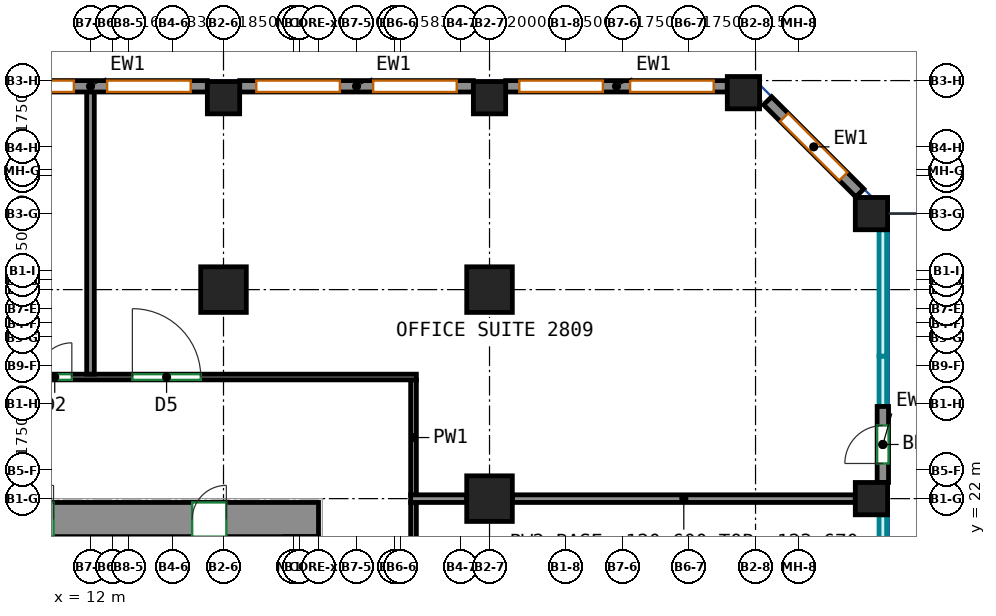
"""IFC4 building model, lengths in metres.
Left out: names, types, materials, properties, quantities, classifications, styles, units other than length and angle.
Written with IfcOpenShell. Run it as: python <this file> out.ifc"""

import sys

from ifc_helpers import new_model, si_unit, direction, frame, frame_2d, origin, origin_2d, place, context, subcontext, project, spatial, rectangle, extrude, source, transform, mapped, element, fill, save


model = new_model("IFC4")
c1 = context("Model", 3, precision=1e-05, world=origin(), true_north=direction((0.0, 1.0)))
c2 = subcontext(c1, "Body", "Model", "MODEL_VIEW")
j1 = project(units=[si_unit("LENGTHUNIT", "METRE"), si_unit("PLANEANGLEUNIT", "RADIAN")], contexts=[c1])
p1 = place(None, origin())
s1 = spatial("IfcSite", under=j1, at=p1, CompositionType="ELEMENT")
p2 = place(p1, origin())
s2 = spatial("IfcBuilding", under=s1, at=p2, CompositionType="ELEMENT")
p3 = place(p2, frame((0.0, 0.0, 120.6)))
s3 = spatial("IfcBuildingStorey", under=s2, at=p3, CompositionType="ELEMENT", Elevation=120.6)
m1 = source(origin(), c2, "Body", "SweptSolid", [
    extrude(rectangle(XDim=1.2, YDim=1.2, at=origin_2d()), origin(), (0.0, 0.0, 1.0), 3.72),
])
p4 = place(p3, frame((15.5, 27.5, 0.0), z_axis=(0.0, 0.0, 1.0), x_axis=(1.0, 0.0, 0.0)))
e1 = element("IfcColumn", 1, at=p4, inside=s3, PredefinedType="COLUMN", context=c2, shape_type="MappedRepresentation", body=[
    mapped(m1, transform((0.0, 0.0, 0.0))),
])
m2 = source(origin(), c2, "Body", "SweptSolid", [
    extrude(rectangle(XDim=0.85, YDim=0.85, at=origin_2d()), origin(), (0.0, 0.0, 1.0), 3.72),
])
p5 = place(p3, frame((15.5, 32.55, 0.0), z_axis=(0.0, 0.0, 1.0), x_axis=(1.0, 0.0, 0.0)))
e2 = element("IfcColumn", 2, at=p5, inside=s3, PredefinedType="COLUMN", context=c2, shape_type="MappedRepresentation", body=[
    mapped(m2, transform((0.0, 0.0, 0.0))),
])
for number, where, z_axis, x_axis in (
    (3, (22.5, 22.0, 0.0), (0.0, 0.0, 1.0), (1.0, 0.0, 0.0)),
    (4, (22.5, 27.5, 0.0), (0.0, 0.0, 1.0), (1.0, 0.0, 0.0)),
):
    element("IfcColumn", number, at=place(p3, frame(where, z_axis=z_axis, x_axis=x_axis)), inside=s3, PredefinedType="COLUMN", context=c2, shape_type="MappedRepresentation", body=[
        mapped(m1, transform((0.0, 0.0, 0.0))),
    ])
for number, where, z_axis, x_axis in (
    (5, (22.5, 32.55, 0.0), (0.0, 0.0, 1.0), (1.0, 0.0, 0.0)),
    (6, (29.182, 32.682, 0.0), (0.0, 0.0, 1.0), (1.0, 0.0, 0.0)),
    (7, (32.55, 22.0, 0.0), (0.0, 0.0, 1.0), (1.0, 0.0, 0.0)),
    (8, (32.55, 29.5, 0.0), (0.0, 0.0, 1.0), (1.0, 0.0, 0.0)),
):
    element("IfcColumn", number, at=place(p3, frame(where, z_axis=z_axis, x_axis=x_axis)), inside=s3, PredefinedType="COLUMN", context=c2, shape_type="MappedRepresentation", body=[
        mapped(m2, transform((0.0, 0.0, 0.0))),
    ])
m3 = source(origin(), c2, "Body", "SweptSolid", [
    extrude(rectangle(XDim=33.9, YDim=0.9, at=frame_2d((16.95, 0.0))), origin(), (0.0, 0.0, 1.0), 3.72),
])
p6 = place(p3, frame((-15.9, 21.45, 0.0), z_axis=(0.0, 0.0, 1.0), x_axis=(1.0, 0.0, 0.0)))
e9 = element("IfcWall", 9, at=p6, inside=s3, PredefinedType="SHEAR", context=c2, shape_type="MappedRepresentation", body=[
    mapped(m3, transform((0.0, 0.0, 0.0))),
])
p7 = place(p6, frame((7.12, 0.0, 0.0)))
e10 = element("IfcOpeningElement", 10, at=p7, cuts=e9, PredefinedType="OPENING", context=c2, shape_type="SweptSolid", body=[
    extrude(rectangle(XDim=0.9, YDim=2.1, at=frame_2d((0.45, 1.05))), frame((0.0, 0.46, 0.0), z_axis=(0.0, -1.0, 0.0), x_axis=(1.0, 0.0, 0.0)), (0.0, 0.0, 1.0), 0.92),
])
p8 = place(p6, frame((12.427, 0.0, 0.0)))
e11 = element("IfcOpeningElement", 11, at=p8, cuts=e9, PredefinedType="OPENING", context=c2, shape_type="SweptSolid", body=[
    extrude(rectangle(XDim=0.9, YDim=2.1, at=frame_2d((0.45, 1.05))), frame((0.0, 0.46, 0.0), z_axis=(0.0, -1.0, 0.0), x_axis=(1.0, 0.0, 0.0)), (0.0, 0.0, 1.0), 0.92),
])
p9 = place(p6, frame((17.465, 0.0, 0.0)))
e12 = element("IfcOpeningElement", 12, at=p9, cuts=e9, PredefinedType="OPENING", context=c2, shape_type="SweptSolid", body=[
    extrude(rectangle(XDim=0.9, YDim=2.1, at=frame_2d((0.45, 1.05))), frame((0.0, 0.46, 0.0), z_axis=(0.0, -1.0, 0.0), x_axis=(1.0, 0.0, 0.0)), (0.0, 0.0, 1.0), 0.92),
])
p10 = place(p6, frame((21.686, 0.0, 0.0)))
e13 = element("IfcOpeningElement", 13, at=p10, cuts=e9, PredefinedType="OPENING", context=c2, shape_type="SweptSolid", body=[
    extrude(rectangle(XDim=0.9, YDim=2.1, at=frame_2d((0.45, 1.05))), frame((0.0, 0.46, 0.0), z_axis=(0.0, -1.0, 0.0), x_axis=(1.0, 0.0, 0.0)), (0.0, 0.0, 1.0), 0.92),
])
p11 = place(p6, frame((26.027, 0.0, 0.0)))
e14 = element("IfcOpeningElement", 14, at=p11, cuts=e9, PredefinedType="OPENING", context=c2, shape_type="SweptSolid", body=[
    extrude(rectangle(XDim=0.9, YDim=2.1, at=frame_2d((0.45, 1.05))), frame((0.0, 0.46, 0.0), z_axis=(0.0, -1.0, 0.0), x_axis=(1.0, 0.0, 0.0)), (0.0, 0.0, 1.0), 0.92),
])
p12 = place(p6, frame((2.425, 0.0, 0.0)))
e15 = element("IfcOpeningElement", 15, at=p12, cuts=e9, PredefinedType="OPENING", context=c2, shape_type="SweptSolid", body=[
    extrude(rectangle(XDim=0.9, YDim=2.1, at=frame_2d((0.45, 1.05))), frame((0.0, 0.46, 0.0), z_axis=(0.0, -1.0, 0.0), x_axis=(1.0, 0.0, 0.0)), (0.0, 0.0, 1.0), 0.92),
])
p13 = place(p6, frame((30.575, 0.0, 0.0)))
e16 = element("IfcOpeningElement", 16, at=p13, cuts=e9, PredefinedType="OPENING", context=c2, shape_type="SweptSolid", body=[
    extrude(rectangle(XDim=0.9, YDim=2.1, at=frame_2d((0.45, 1.05))), frame((0.0, 0.46, 0.0), z_axis=(0.0, -1.0, 0.0), x_axis=(1.0, 0.0, 0.0)), (0.0, 0.0, 1.0), 0.92),
])
m4 = source(origin(), c2, "Body", "SweptSolid", [
    extrude(rectangle(XDim=2.0, YDim=0.3, at=frame_2d((1.0, 0.0))), origin(), (0.0, 0.0, 1.0), 3.72),
])
p14 = place(p3, frame((32.85, 22.425, 0.0), z_axis=(0.0, 0.0, 1.0), x_axis=(0.0, 1.0, 0.0)))
e17 = element("IfcWall", 17, at=p14, inside=s3, PredefinedType="SOLIDWALL", context=c2, shape_type="MappedRepresentation", body=[
    mapped(m4, transform((0.0, 0.0, 0.0))),
])
p15 = place(p14, frame((0.5, 0.0, 0.0)))
e18 = element("IfcOpeningElement", 18, at=p15, cuts=e17, PredefinedType="OPENING", context=c2, shape_type="SweptSolid", body=[
    extrude(rectangle(XDim=1.0, YDim=2.1, at=frame_2d((0.5, 1.05))), frame((0.0, 0.16, 0.0), z_axis=(0.0, -1.0, 0.0), x_axis=(1.0, 0.0, 0.0)), (0.0, 0.0, 1.0), 0.32),
])
m5 = source(origin(), c2, "Body", "SweptSolid", [
    extrude(rectangle(XDim=3.429, YDim=0.3, at=frame_2d((1.715, 0.0))), origin(), (0.0, 0.0, 1.0), 3.72),
])
p16 = place(p3, frame((32.244, 30.044, 0.0), z_axis=(0.0, 0.0, 1.0), x_axis=(-0.707106781187, 0.707106781187, 0.0)))
e19 = element("IfcWall", 19, at=p16, inside=s3, PredefinedType="SOLIDWALL", context=c2, shape_type="MappedRepresentation", body=[
    mapped(m5, transform((0.0, 0.0, 0.0))),
])
p17 = place(p16, frame((0.615, 0.0, 0.7)))
e20 = element("IfcOpeningElement", 20, at=p17, cuts=e19, PredefinedType="OPENING", context=c2, shape_type="SweptSolid", body=[
    extrude(rectangle(XDim=2.2, YDim=2.25, at=frame_2d((1.1, 1.125))), frame((0.0, 0.16, 0.0), z_axis=(0.0, -1.0, 0.0), x_axis=(1.0, 0.0, 0.0)), (0.0, 0.0, 1.0), 0.32),
])
m6 = source(origin(), c2, "Body", "SweptSolid", [
    extrude(rectangle(XDim=5.832, YDim=0.3, at=frame_2d((2.916, 0.0))), origin(), (0.0, 0.0, 1.0), 3.72),
])
p18 = place(p3, frame((28.757, 32.85, 0.0), z_axis=(0.0, 0.0, 1.0), x_axis=(-1.0, 0.0, 0.0)))
e21 = element("IfcWall", 21, at=p18, inside=s3, PredefinedType="SOLIDWALL", context=c2, shape_type="MappedRepresentation", body=[
    mapped(m6, transform((0.0, 0.0, 0.0))),
])
p19 = place(p18, frame((0.358, 0.0, 0.7)))
e22 = element("IfcOpeningElement", 22, at=p19, cuts=e21, PredefinedType="OPENING", context=c2, shape_type="SweptSolid", body=[
    extrude(rectangle(XDim=2.2, YDim=2.25, at=frame_2d((1.1, 1.125))), frame((0.0, 0.16, 0.0), z_axis=(0.0, -1.0, 0.0), x_axis=(1.0, 0.0, 0.0)), (0.0, 0.0, 1.0), 0.32),
])
p20 = place(p18, frame((3.274, 0.0, 0.7)))
e23 = element("IfcOpeningElement", 23, at=p20, cuts=e21, PredefinedType="OPENING", context=c2, shape_type="SweptSolid", body=[
    extrude(rectangle(XDim=2.2, YDim=2.25, at=frame_2d((1.1, 1.125))), frame((0.0, 0.16, 0.0), z_axis=(0.0, -1.0, 0.0), x_axis=(1.0, 0.0, 0.0)), (0.0, 0.0, 1.0), 0.32),
])
m7 = source(origin(), c2, "Body", "SweptSolid", [
    extrude(rectangle(XDim=6.15, YDim=0.3, at=frame_2d((3.075, 0.0))), origin(), (0.0, 0.0, 1.0), 3.72),
])
p21 = place(p3, frame((22.075, 32.85, 0.0), z_axis=(0.0, 0.0, 1.0), x_axis=(-1.0, 0.0, 0.0)))
e24 = element("IfcWall", 24, at=p21, inside=s3, PredefinedType="SOLIDWALL", context=c2, shape_type="MappedRepresentation", body=[
    mapped(m7, transform((0.0, 0.0, 0.0))),
])
p22 = place(p21, frame((0.438, 0.0, 0.7)))
e25 = element("IfcOpeningElement", 25, at=p22, cuts=e24, PredefinedType="OPENING", context=c2, shape_type="SweptSolid", body=[
    extrude(rectangle(XDim=2.2, YDim=2.25, at=frame_2d((1.1, 1.125))), frame((0.0, 0.16, 0.0), z_axis=(0.0, -1.0, 0.0), x_axis=(1.0, 0.0, 0.0)), (0.0, 0.0, 1.0), 0.32),
])
p23 = place(p21, frame((3.512, 0.0, 0.7)))
e26 = element("IfcOpeningElement", 26, at=p23, cuts=e24, PredefinedType="OPENING", context=c2, shape_type="SweptSolid", body=[
    extrude(rectangle(XDim=2.2, YDim=2.25, at=frame_2d((1.1, 1.125))), frame((0.0, 0.16, 0.0), z_axis=(0.0, -1.0, 0.0), x_axis=(1.0, 0.0, 0.0)), (0.0, 0.0, 1.0), 0.32),
])
p24 = place(p3, frame((15.075, 32.85, 0.0), z_axis=(0.0, 0.0, 1.0), x_axis=(-1.0, 0.0, 0.0)))
e27 = element("IfcWall", 27, at=p24, inside=s3, PredefinedType="SOLIDWALL", context=c2, shape_type="MappedRepresentation", body=[
    mapped(m7, transform((0.0, 0.0, 0.0))),
])
p25 = place(p24, frame((0.438, 0.0, 0.7)))
e28 = element("IfcOpeningElement", 28, at=p25, cuts=e27, PredefinedType="OPENING", context=c2, shape_type="SweptSolid", body=[
    extrude(rectangle(XDim=2.2, YDim=2.25, at=frame_2d((1.1, 1.125))), frame((0.0, 0.16, 0.0), z_axis=(0.0, -1.0, 0.0), x_axis=(1.0, 0.0, 0.0)), (0.0, 0.0, 1.0), 0.32),
])
p26 = place(p24, frame((3.512, 0.0, 0.7)))
e29 = element("IfcOpeningElement", 29, at=p26, cuts=e27, PredefinedType="OPENING", context=c2, shape_type="SweptSolid", body=[
    extrude(rectangle(XDim=2.2, YDim=2.25, at=frame_2d((1.1, 1.125))), frame((0.0, 0.16, 0.0), z_axis=(0.0, -1.0, 0.0), x_axis=(1.0, 0.0, 0.0)), (0.0, 0.0, 1.0), 0.32),
])
p27 = place(p3, frame((20.5, 17.75, 0.0), z_axis=(0.0, 0.0, 1.0), x_axis=(0.0, 1.0, 0.0)))
e30 = element("IfcWall", 30, at=p27, inside=s3, PredefinedType="PARTITIONING", context=c2, shape_type="SweptSolid", body=[
    extrude(rectangle(XDim=4.16, YDim=0.15, at=frame_2d((2.08, 0.0))), origin(), (0.0, 0.0, 1.0), 3.72),
])
p28 = place(p3, frame((20.5, 22.09, 0.0), z_axis=(0.0, 0.0, 1.0), x_axis=(0.0, 1.0, 0.0)))
e31 = element("IfcWall", 31, at=p28, inside=s3, PredefinedType="PARTITIONING", context=c2, shape_type="SweptSolid", body=[
    extrude(rectangle(XDim=3.035, YDim=0.15, at=frame_2d((1.518, 0.0))), origin(), (0.0, 0.0, 1.0), 3.72),
])
p29 = place(p3, frame((-19.6, 25.2, 0.0), z_axis=(0.0, 0.0, 1.0), x_axis=(1.0, 0.0, 0.0)))
e32 = element("IfcWall", 32, at=p29, inside=s3, PredefinedType="PARTITIONING", context=c2, shape_type="SweptSolid", body=[
    extrude(rectangle(XDim=40.175, YDim=0.15, at=frame_2d((20.087, 0.0))), origin(), (0.0, 0.0, 1.0), 3.72),
])
p30 = place(p29, frame((1.104, 0.0, 0.0)))
e33 = element("IfcOpeningElement", 33, at=p30, cuts=e32, PredefinedType="OPENING", context=c2, shape_type="SweptSolid", body=[
    extrude(rectangle(XDim=0.9, YDim=2.1, at=frame_2d((0.45, 1.05))), frame((0.0, 0.085, 0.0), z_axis=(0.0, -1.0, 0.0), x_axis=(1.0, 0.0, 0.0)), (0.0, 0.0, 1.0), 0.17),
])
p31 = place(p29, frame((5.296, 0.0, 0.0)))
e34 = element("IfcOpeningElement", 34, at=p31, cuts=e32, PredefinedType="OPENING", context=c2, shape_type="SweptSolid", body=[
    extrude(rectangle(XDim=0.9, YDim=2.1, at=frame_2d((0.45, 1.05))), frame((0.0, 0.085, 0.0), z_axis=(0.0, -1.0, 0.0), x_axis=(1.0, 0.0, 0.0)), (0.0, 0.0, 1.0), 0.17),
])
p32 = place(p29, frame((18.302, 0.0, 0.0)))
e35 = element("IfcOpeningElement", 35, at=p32, cuts=e32, PredefinedType="OPENING", context=c2, shape_type="SweptSolid", body=[
    extrude(rectangle(XDim=1.0, YDim=2.1, at=frame_2d((0.5, 1.05))), frame((0.0, 0.085, 0.0), z_axis=(0.0, -1.0, 0.0), x_axis=(1.0, 0.0, 0.0)), (0.0, 0.0, 1.0), 0.17),
])
p33 = place(p29, frame((30.209, 0.0, 0.0)))
e36 = element("IfcOpeningElement", 36, at=p33, cuts=e32, PredefinedType="OPENING", context=c2, shape_type="SweptSolid", body=[
    extrude(rectangle(XDim=0.9, YDim=2.1, at=frame_2d((0.45, 1.05))), frame((0.0, 0.085, 0.0), z_axis=(0.0, -1.0, 0.0), x_axis=(1.0, 0.0, 0.0)), (0.0, 0.0, 1.0), 0.17),
])
p34 = place(p29, frame((32.702, 0.0, 0.0)))
e37 = element("IfcOpeningElement", 37, at=p34, cuts=e32, PredefinedType="OPENING", context=c2, shape_type="SweptSolid", body=[
    extrude(rectangle(XDim=1.8, YDim=2.1, at=frame_2d((0.9, 1.05))), frame((0.0, 0.085, 0.0), z_axis=(0.0, -1.0, 0.0), x_axis=(1.0, 0.0, 0.0)), (0.0, 0.0, 1.0), 0.17),
])
p35 = place(p3, frame((20.426, 22.0, 0.0), z_axis=(0.0, 0.0, 1.0), x_axis=(1.0, 0.0, 0.0)))
e38 = element("IfcWall", 38, at=p35, inside=s3, PredefinedType="PARTITIONING", context=c2, shape_type="SweptSolid", body=[
    extrude(rectangle(XDim=1.474, YDim=0.2, at=frame_2d((0.737, 0.0))), origin(), (0.0, 0.0, 1.0), 3.72),
])
p36 = place(p3, frame((23.1, 22.0, 0.0), z_axis=(0.0, 0.0, 1.0), x_axis=(1.0, 0.0, 0.0)))
e39 = element("IfcWall", 39, at=p36, inside=s3, PredefinedType="PARTITIONING", context=c2, shape_type="SweptSolid", body=[
    extrude(rectangle(XDim=9.025, YDim=0.2, at=frame_2d((4.512, 0.0))), origin(), (0.0, 0.0, 1.0), 3.07),
])
p37 = place(p3, frame((12.0, 25.276, 0.0), z_axis=(0.0, 0.0, 1.0), x_axis=(0.0, 1.0, 0.0)))
e40 = element("IfcWall", 40, at=p37, inside=s3, PredefinedType="PARTITIONING", context=c2, shape_type="SweptSolid", body=[
    extrude(rectangle(XDim=7.474, YDim=0.2, at=frame_2d((3.737, 0.0))), origin(), (0.0, 0.0, 1.0), 3.72),
])
p38 = place(p15, origin())
e41 = element("IfcDoor", 41, at=p38, inside=s3, OperationType="SINGLE_SWING_LEFT", PredefinedType="DOOR", context=c2, shape_type="SweptSolid", body=[
    extrude(rectangle(XDim=1.0, YDim=2.1, at=frame_2d((0.5, 1.05))), frame((0.0, 0.025, 0.0), z_axis=(0.0, -1.0, 0.0), x_axis=(1.0, 0.0, 0.0)), (0.0, 0.0, 1.0), 0.05),
])
fill(e18, e41)
p39 = place(p17, origin())
e42 = element("IfcWindow", 42, at=p39, inside=s3, PartitioningType="SINGLE_PANEL", PredefinedType="WINDOW", context=c2, shape_type="SweptSolid", body=[
    extrude(rectangle(XDim=2.2, YDim=2.25, at=frame_2d((1.1, 1.125))), frame((0.0, 0.03, 0.0), z_axis=(0.0, -1.0, 0.0), x_axis=(1.0, 0.0, 0.0)), (0.0, 0.0, 1.0), 0.06),
])
fill(e20, e42)
p40 = place(p19, origin())
e43 = element("IfcWindow", 43, at=p40, inside=s3, PartitioningType="SINGLE_PANEL", PredefinedType="WINDOW", context=c2, shape_type="SweptSolid", body=[
    extrude(rectangle(XDim=2.2, YDim=2.25, at=frame_2d((1.1, 1.125))), frame((0.0, 0.03, 0.0), z_axis=(0.0, -1.0, 0.0), x_axis=(1.0, 0.0, 0.0)), (0.0, 0.0, 1.0), 0.06),
])
fill(e22, e43)
p41 = place(p20, origin())
e44 = element("IfcWindow", 44, at=p41, inside=s3, PartitioningType="SINGLE_PANEL", PredefinedType="WINDOW", context=c2, shape_type="SweptSolid", body=[
    extrude(rectangle(XDim=2.2, YDim=2.25, at=frame_2d((1.1, 1.125))), frame((0.0, 0.03, 0.0), z_axis=(0.0, -1.0, 0.0), x_axis=(1.0, 0.0, 0.0)), (0.0, 0.0, 1.0), 0.06),
])
fill(e23, e44)
p42 = place(p22, origin())
e45 = element("IfcWindow", 45, at=p42, inside=s3, PartitioningType="SINGLE_PANEL", PredefinedType="WINDOW", context=c2, shape_type="SweptSolid", body=[
    extrude(rectangle(XDim=2.2, YDim=2.25, at=frame_2d((1.1, 1.125))), frame((0.0, 0.03, 0.0), z_axis=(0.0, -1.0, 0.0), x_axis=(1.0, 0.0, 0.0)), (0.0, 0.0, 1.0), 0.06),
])
fill(e25, e45)
p43 = place(p23, origin())
e46 = element("IfcWindow", 46, at=p43, inside=s3, PartitioningType="SINGLE_PANEL", PredefinedType="WINDOW", context=c2, shape_type="SweptSolid", body=[
    extrude(rectangle(XDim=2.2, YDim=2.25, at=frame_2d((1.1, 1.125))), frame((0.0, 0.03, 0.0), z_axis=(0.0, -1.0, 0.0), x_axis=(1.0, 0.0, 0.0)), (0.0, 0.0, 1.0), 0.06),
])
fill(e26, e46)
p44 = place(p25, origin())
e47 = element("IfcWindow", 47, at=p44, inside=s3, PartitioningType="SINGLE_PANEL", PredefinedType="WINDOW", context=c2, shape_type="SweptSolid", body=[
    extrude(rectangle(XDim=2.2, YDim=2.25, at=frame_2d((1.1, 1.125))), frame((0.0, 0.03, 0.0), z_axis=(0.0, -1.0, 0.0), x_axis=(1.0, 0.0, 0.0)), (0.0, 0.0, 1.0), 0.06),
])
fill(e28, e47)
p45 = place(p26, origin())
e48 = element("IfcWindow", 48, at=p45, inside=s3, PartitioningType="SINGLE_PANEL", PredefinedType="WINDOW", context=c2, shape_type="SweptSolid", body=[
    extrude(rectangle(XDim=2.2, YDim=2.25, at=frame_2d((1.1, 1.125))), frame((0.0, 0.03, 0.0), z_axis=(0.0, -1.0, 0.0), x_axis=(1.0, 0.0, 0.0)), (0.0, 0.0, 1.0), 0.06),
])
fill(e29, e48)
p46 = place(p11, origin())
e49 = element("IfcDoor", 49, at=p46, inside=s3, OperationType="SINGLE_SWING_RIGHT", PredefinedType="DOOR", context=c2, shape_type="SweptSolid", body=[
    extrude(rectangle(XDim=0.9, YDim=2.1, at=frame_2d((0.45, 1.05))), frame((0.0, -0.305, 0.0), z_axis=(0.0, -1.0, 0.0), x_axis=(1.0, 0.0, 0.0)), (0.0, 0.0, 1.0), 0.05),
])
fill(e14, e49)
p47 = place(p13, origin())
e50 = element("IfcDoor", 50, at=p47, inside=s3, OperationType="SINGLE_SWING_RIGHT", PredefinedType="DOOR", context=c2, shape_type="SweptSolid", body=[
    extrude(rectangle(XDim=0.9, YDim=2.1, at=frame_2d((0.45, 1.05))), frame((0.0, -0.305, 0.0), z_axis=(0.0, -1.0, 0.0), x_axis=(1.0, 0.0, 0.0)), (0.0, 0.0, 1.0), 0.05),
])
fill(e16, e50)
p48 = place(p33, origin())
e51 = element("IfcDoor", 51, at=p48, inside=s3, OperationType="SINGLE_SWING_RIGHT", PredefinedType="DOOR", context=c2, shape_type="SweptSolid", body=[
    extrude(rectangle(XDim=0.9, YDim=2.1, at=frame_2d((0.45, 1.05))), frame((0.0, 0.025, 0.0), z_axis=(0.0, -1.0, 0.0), x_axis=(1.0, 0.0, 0.0)), (0.0, 0.0, 1.0), 0.05),
])
fill(e36, e51)
p49 = place(p34, origin())
e52 = element("IfcDoor", 52, at=p49, inside=s3, OperationType="DOUBLE_DOOR_SINGLE_SWING", PredefinedType="DOOR", context=c2, shape_type="SweptSolid", body=[
    extrude(rectangle(XDim=1.8, YDim=2.1, at=frame_2d((0.9, 1.05))), frame((0.0, 0.025, 0.0), z_axis=(0.0, -1.0, 0.0), x_axis=(1.0, 0.0, 0.0)), (0.0, 0.0, 1.0), 0.05),
])
fill(e37, e52)
save(model, sys.argv[1])
